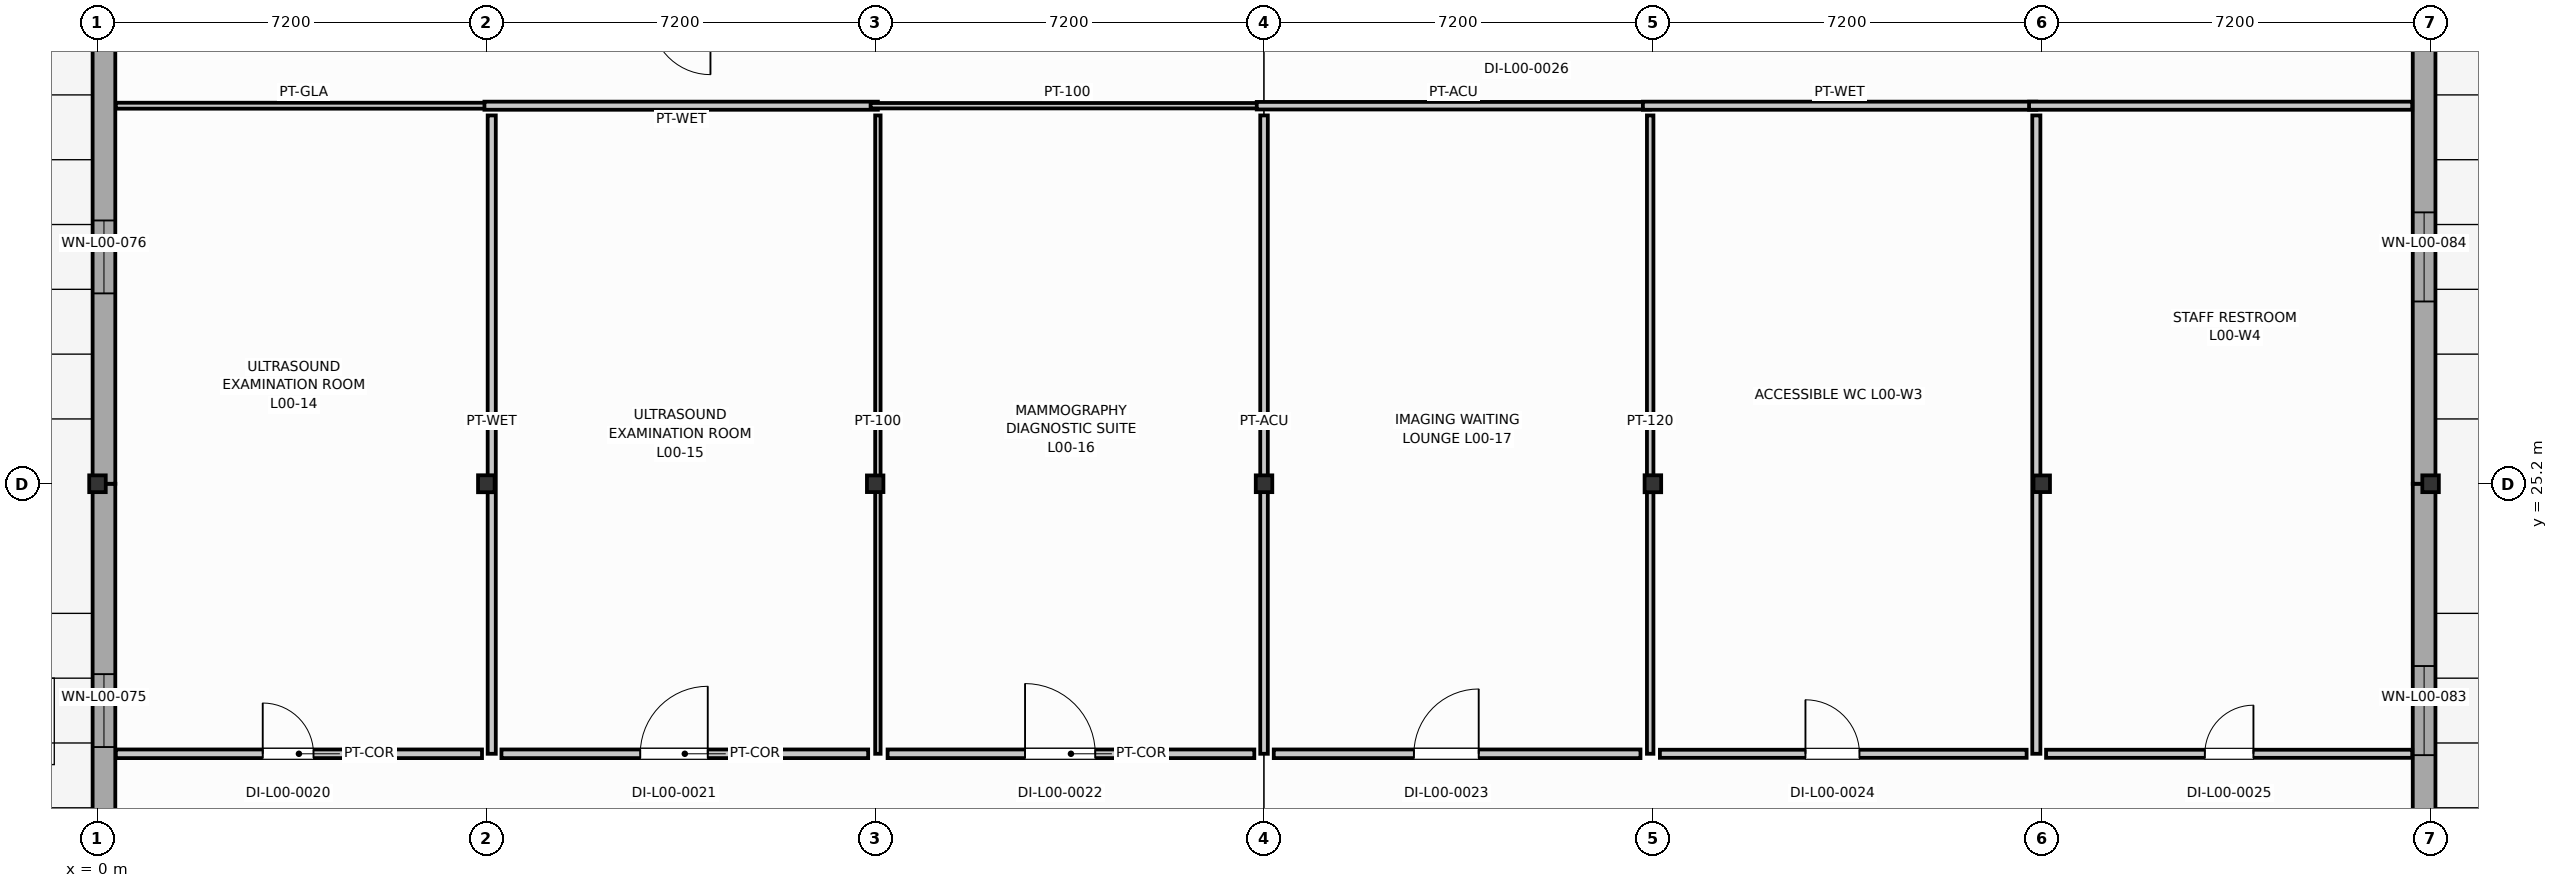
"""IFC4 building model, lengths in metres.
Left out: names, types, materials, properties, quantities, classifications, styles, units other than length and angle.
Written with IfcOpenShell. Run it as: python <this file> out.ifc"""

import sys

from ifc_helpers import new_model, si_unit, direction, frame, frame_2d, origin, origin_2d, place, context, subcontext, project, spatial, rectangle, i_section, extrude, element, fill, save


model = new_model("IFC4")
c1 = context("Model", 3, precision=1e-05, world=origin(), true_north=direction((0.0, 1.0)))
c2 = subcontext(c1, "Body", "Model", "MODEL_VIEW")
j1 = project(units=[si_unit("LENGTHUNIT", "METRE"), si_unit("PLANEANGLEUNIT", "RADIAN")], contexts=[c1])
p1 = place(None, origin())
s1 = spatial("IfcSite", under=j1, at=p1, CompositionType="ELEMENT")
p2 = place(p1, origin())
s2 = spatial("IfcBuilding", under=s1, at=p2, CompositionType="ELEMENT")
p3 = place(p2, origin())
s3 = spatial("IfcBuildingStorey", under=s2, at=p3, CompositionType="ELEMENT", Elevation=0.0)
p4 = place(p3, frame((0.0, 25.2, 0.0), z_axis=(0.0, 0.0, 1.0), x_axis=(1.0, 0.0, 0.0)))
e1 = element("IfcColumn", 1, at=p4, inside=s3, PredefinedType="COLUMN", context=c2, shape_type="SweptSolid", body=[
    extrude(i_section(OverallWidth=0.306, OverallDepth=0.311, WebThickness=0.011, FlangeThickness=0.017, FilletRadius=0.015, at=origin_2d()), origin(), (0.0, 0.0, 1.0), 4.8),
])
p5 = place(p3, frame((7.2, 25.2, 0.0), z_axis=(0.0, 0.0, 1.0), x_axis=(1.0, 0.0, 0.0)))
e2 = element("IfcColumn", 2, at=p5, inside=s3, PredefinedType="COLUMN", context=c2, shape_type="SweptSolid", body=[
    extrude(i_section(OverallWidth=0.307, OverallDepth=0.314, WebThickness=0.012, FlangeThickness=0.019, FilletRadius=0.016, at=origin_2d()), origin(), (0.0, 0.0, 1.0), 4.8),
])
p6 = place(p3, frame((14.4, 25.2, 0.0), z_axis=(0.0, 0.0, 1.0), x_axis=(1.0, 0.0, 0.0)))
e3 = element("IfcColumn", 3, at=p6, inside=s3, PredefinedType="COLUMN", context=c2, shape_type="SweptSolid", body=[
    extrude(i_section(OverallWidth=0.305, OverallDepth=0.308, WebThickness=0.01, FlangeThickness=0.015, FilletRadius=0.015, at=origin_2d()), origin(), (0.0, 0.0, 1.0), 4.8),
])
p7 = place(p3, frame((21.6, 25.2, 0.0), z_axis=(0.0, 0.0, 1.0), x_axis=(1.0, 0.0, 0.0)))
e4 = element("IfcColumn", 4, at=p7, inside=s3, PredefinedType="COLUMN", context=c2, shape_type="SweptSolid", body=[
    extrude(i_section(OverallWidth=0.306, OverallDepth=0.311, WebThickness=0.011, FlangeThickness=0.017, FilletRadius=0.015, at=origin_2d()), origin(), (0.0, 0.0, 1.0), 4.8),
])
p8 = place(p3, frame((28.8, 25.2, 0.0), z_axis=(0.0, 0.0, 1.0), x_axis=(1.0, 0.0, 0.0)))
e5 = element("IfcColumn", 5, at=p8, inside=s3, PredefinedType="COLUMN", context=c2, shape_type="SweptSolid", body=[
    extrude(i_section(OverallWidth=0.307, OverallDepth=0.314, WebThickness=0.012, FlangeThickness=0.019, FilletRadius=0.016, at=origin_2d()), origin(), (0.0, 0.0, 1.0), 4.8),
])
p9 = place(p3, frame((36.0, 25.2, 0.0), z_axis=(0.0, 0.0, 1.0), x_axis=(1.0, 0.0, 0.0)))
e6 = element("IfcColumn", 6, at=p9, inside=s3, PredefinedType="COLUMN", context=c2, shape_type="SweptSolid", body=[
    extrude(i_section(OverallWidth=0.305, OverallDepth=0.308, WebThickness=0.01, FlangeThickness=0.015, FilletRadius=0.015, at=origin_2d()), origin(), (0.0, 0.0, 1.0), 4.8),
])
p10 = place(p3, frame((43.2, 25.2, 0.0), z_axis=(0.0, 0.0, 1.0), x_axis=(1.0, 0.0, 0.0)))
e7 = element("IfcColumn", 7, at=p10, inside=s3, PredefinedType="COLUMN", context=c2, shape_type="SweptSolid", body=[
    extrude(i_section(OverallWidth=0.306, OverallDepth=0.311, WebThickness=0.011, FlangeThickness=0.017, FilletRadius=0.015, at=origin_2d()), origin(), (0.0, 0.0, 1.0), 4.8),
])
p11 = place(p3, frame((0.12, 16.8, 0.0), z_axis=(0.0, 0.0, 1.0), x_axis=(0.0, 1.0, 0.0)))
e8 = element("IfcWall", 8, at=p11, inside=s3, PredefinedType="SOLIDWALL", context=c2, shape_type="SweptSolid", body=[
    extrude(rectangle(XDim=8.4, YDim=0.42, at=frame_2d((4.2, 0.0))), origin(), (0.0, 0.0, 1.0), 3.691),
])
p12 = place(p11, frame((3.525, 0.0, 0.95)))
e9 = element("IfcOpeningElement", 9, at=p12, cuts=e8, PredefinedType="OPENING", context=c2, shape_type="SweptSolid", body=[
    extrude(rectangle(XDim=1.35, YDim=1.55, at=frame_2d((0.675, 0.775))), frame((0.0, 0.22, 0.0), z_axis=(0.0, -1.0, 0.0), x_axis=(1.0, 0.0, 0.0)), (0.0, 0.0, 1.0), 0.44),
])
p13 = place(p3, frame((0.12, 25.2, 0.0), z_axis=(0.0, 0.0, 1.0), x_axis=(0.0, 1.0, 0.0)))
e10 = element("IfcWall", 10, at=p13, inside=s3, PredefinedType="SOLIDWALL", context=c2, shape_type="SweptSolid", body=[
    extrude(rectangle(XDim=8.4, YDim=0.42, at=frame_2d((4.2, 0.0))), origin(), (0.0, 0.0, 1.0), 3.772),
])
p14 = place(p13, frame((3.525, 0.0, 0.95)))
e11 = element("IfcOpeningElement", 11, at=p14, cuts=e10, PredefinedType="OPENING", context=c2, shape_type="SweptSolid", body=[
    extrude(rectangle(XDim=1.35, YDim=1.75, at=frame_2d((0.675, 0.875))), frame((0.0, 0.22, 0.0), z_axis=(0.0, -1.0, 0.0), x_axis=(1.0, 0.0, 0.0)), (0.0, 0.0, 1.0), 0.44),
])
p15 = place(p3, frame((43.08, 16.8, 0.0), z_axis=(0.0, 0.0, 1.0), x_axis=(0.0, 1.0, 0.0)))
e12 = element("IfcWall", 12, at=p15, inside=s3, PredefinedType="SOLIDWALL", context=c2, shape_type="SweptSolid", body=[
    extrude(rectangle(XDim=8.4, YDim=0.42, at=frame_2d((4.2, 0.0))), origin(), (0.0, 0.0, 1.0), 3.998),
])
p16 = place(p15, frame((3.375, 0.0, 0.95)))
e13 = element("IfcOpeningElement", 13, at=p16, cuts=e12, PredefinedType="OPENING", context=c2, shape_type="SweptSolid", body=[
    extrude(rectangle(XDim=1.65, YDim=1.55, at=frame_2d((0.825, 0.775))), frame((0.0, 0.22, 0.0), z_axis=(0.0, -1.0, 0.0), x_axis=(1.0, 0.0, 0.0)), (0.0, 0.0, 1.0), 0.44),
])
p17 = place(p3, frame((43.08, 25.2, 0.0), z_axis=(0.0, 0.0, 1.0), x_axis=(0.0, 1.0, 0.0)))
e14 = element("IfcWall", 14, at=p17, inside=s3, PredefinedType="SOLIDWALL", context=c2, shape_type="SweptSolid", body=[
    extrude(rectangle(XDim=8.4, YDim=0.42, at=frame_2d((4.2, 0.0))), origin(), (0.0, 0.0, 1.0), 4.005),
])
p18 = place(p17, frame((3.375, 0.0, 0.95)))
e15 = element("IfcOpeningElement", 15, at=p18, cuts=e14, PredefinedType="OPENING", context=c2, shape_type="SweptSolid", body=[
    extrude(rectangle(XDim=1.65, YDim=1.75, at=frame_2d((0.825, 0.875))), frame((0.0, 0.22, 0.0), z_axis=(0.0, -1.0, 0.0), x_axis=(1.0, 0.0, 0.0)), (0.0, 0.0, 1.0), 0.44),
])
p19 = place(p3, frame((0.34, 32.2, 0.0), z_axis=(0.0, 0.0, 1.0), x_axis=(1.0, 0.0, 0.0)))
e16 = element("IfcWall", 16, at=p19, inside=s3, PredefinedType="MOVABLE", context=c2, shape_type="SweptSolid", body=[
    extrude(rectangle(XDim=6.96, YDim=0.11, at=frame_2d((3.48, 0.0))), origin(), (0.0, 0.0, 1.0), 4.001),
])
p20 = place(p3, frame((7.3, 32.02, 0.0), z_axis=(0.0, 0.0, 1.0), x_axis=(0.0, -1.0, 0.0)))
e17 = element("IfcWall", 17, at=p20, inside=s3, PredefinedType="PLUMBINGWALL", context=c2, shape_type="SweptSolid", body=[
    extrude(rectangle(XDim=11.82, YDim=0.15, at=frame_2d((5.91, 0.0))), origin(), (0.0, 0.0, 1.0), 3.928),
])
p21 = place(p3, frame((7.12, 20.2, 0.0), z_axis=(0.0, 0.0, 1.0), x_axis=(-1.0, 0.0, 0.0)))
e18 = element("IfcWall", 18, at=p21, inside=s3, PredefinedType="PARTITIONING", context=c2, shape_type="SweptSolid", body=[
    extrude(rectangle(XDim=6.78, YDim=0.16, at=frame_2d((3.39, 0.0))), origin(), (0.0, 0.0, 1.0), 3.928),
])
p22 = place(p21, frame((3.12, 0.0, 0.0)))
e19 = element("IfcOpeningElement", 19, at=p22, cuts=e18, PredefinedType="OPENING", context=c2, shape_type="SweptSolid", body=[
    extrude(rectangle(XDim=0.94, YDim=2.05, at=frame_2d((0.47, 1.025))), frame((0.0, 0.09, 0.0), z_axis=(0.0, -1.0, 0.0), x_axis=(1.0, 0.0, 0.0)), (0.0, 0.0, 1.0), 0.18),
])
p23 = place(p3, frame((7.165, 32.2, 0.0), z_axis=(0.0, 0.0, 1.0), x_axis=(1.0, 0.0, 0.0)))
e20 = element("IfcWall", 20, at=p23, inside=s3, PredefinedType="PLUMBINGWALL", context=c2, shape_type="SweptSolid", body=[
    extrude(rectangle(XDim=7.285, YDim=0.15, at=frame_2d((3.643, 0.0))), origin(), (0.0, 0.0, 1.0), 4.001),
])
p24 = place(p3, frame((14.45, 32.02, 0.0), z_axis=(0.0, 0.0, 1.0), x_axis=(0.0, -1.0, 0.0)))
e21 = element("IfcWall", 21, at=p24, inside=s3, PredefinedType="PARTITIONING", context=c2, shape_type="SweptSolid", body=[
    extrude(rectangle(XDim=11.82, YDim=0.1, at=frame_2d((5.91, 0.0))), origin(), (0.0, 0.0, 1.0), 4.008),
])
p25 = place(p3, frame((14.27, 20.2, 0.0), z_axis=(0.0, 0.0, 1.0), x_axis=(-1.0, 0.0, 0.0)))
e22 = element("IfcWall", 22, at=p25, inside=s3, PredefinedType="PARTITIONING", context=c2, shape_type="SweptSolid", body=[
    extrude(rectangle(XDim=6.79, YDim=0.16, at=frame_2d((3.395, 0.0))), origin(), (0.0, 0.0, 1.0), 4.008),
])
p26 = place(p25, frame((2.97, 0.0, 0.0)))
e23 = element("IfcOpeningElement", 23, at=p26, cuts=e22, PredefinedType="OPENING", context=c2, shape_type="SweptSolid", body=[
    extrude(rectangle(XDim=1.25, YDim=2.15, at=frame_2d((0.625, 1.075))), frame((0.0, 0.09, 0.0), z_axis=(0.0, -1.0, 0.0), x_axis=(1.0, 0.0, 0.0)), (0.0, 0.0, 1.0), 0.18),
])
p27 = place(p3, frame((14.315, 32.2, 0.0), z_axis=(0.0, 0.0, 1.0), x_axis=(1.0, 0.0, 0.0)))
e24 = element("IfcWall", 24, at=p27, inside=s3, PredefinedType="PARTITIONING", context=c2, shape_type="SweptSolid", body=[
    extrude(rectangle(XDim=7.285, YDim=0.1, at=frame_2d((3.643, 0.0))), origin(), (0.0, 0.0, 1.0), 4.079),
])
p28 = place(p3, frame((21.6, 32.02, 0.0), z_axis=(0.0, 0.0, 1.0), x_axis=(0.0, -1.0, 0.0)))
e25 = element("IfcWall", 25, at=p28, inside=s3, PredefinedType="PARTITIONING", context=c2, shape_type="SweptSolid", body=[
    extrude(rectangle(XDim=11.82, YDim=0.14, at=frame_2d((5.91, 0.0))), origin(), (0.0, 0.0, 1.0), 4.085),
])
p29 = place(p3, frame((21.42, 20.2, 0.0), z_axis=(0.0, 0.0, 1.0), x_axis=(-1.0, 0.0, 0.0)))
e26 = element("IfcWall", 26, at=p29, inside=s3, PredefinedType="PARTITIONING", context=c2, shape_type="SweptSolid", body=[
    extrude(rectangle(XDim=6.79, YDim=0.16, at=frame_2d((3.395, 0.0))), origin(), (0.0, 0.0, 1.0), 4.008),
])
p30 = place(p29, frame((2.945, 0.0, 0.0)))
e27 = element("IfcOpeningElement", 27, at=p30, cuts=e26, PredefinedType="OPENING", context=c2, shape_type="SweptSolid", body=[
    extrude(rectangle(XDim=1.3, YDim=2.15, at=frame_2d((0.65, 1.075))), frame((0.0, 0.09, 0.0), z_axis=(0.0, -1.0, 0.0), x_axis=(1.0, 0.0, 0.0)), (0.0, 0.0, 1.0), 0.18),
])
p31 = place(p3, frame((21.465, 32.2, 0.0), z_axis=(0.0, 0.0, 1.0), x_axis=(1.0, 0.0, 0.0)))
e28 = element("IfcWall", 28, at=p31, inside=s3, PredefinedType="PARTITIONING", context=c2, shape_type="SweptSolid", body=[
    extrude(rectangle(XDim=7.285, YDim=0.14, at=frame_2d((3.643, 0.0))), origin(), (0.0, 0.0, 1.0), 4.079),
])
p32 = place(p3, frame((28.75, 32.02, 0.0), z_axis=(0.0, 0.0, 1.0), x_axis=(0.0, -1.0, 0.0)))
e29 = element("IfcWall", 29, at=p32, inside=s3, PredefinedType="PARTITIONING", context=c2, shape_type="SweptSolid", body=[
    extrude(rectangle(XDim=11.82, YDim=0.12, at=frame_2d((5.91, 0.0))), origin(), (0.0, 0.0, 1.0), 4.008),
])
p33 = place(p3, frame((28.57, 20.2, 0.0), z_axis=(0.0, 0.0, 1.0), x_axis=(-1.0, 0.0, 0.0)))
e30 = element("IfcWall", 30, at=p33, inside=s3, PredefinedType="PARTITIONING", context=c2, shape_type="SweptSolid", body=[
    extrude(rectangle(XDim=6.79, YDim=0.16, at=frame_2d((3.395, 0.0))), origin(), (0.0, 0.0, 1.0), 4.008),
])
p34 = place(p33, frame((2.995, 0.0, 0.0)))
e31 = element("IfcOpeningElement", 31, at=p34, cuts=e30, PredefinedType="OPENING", context=c2, shape_type="SweptSolid", body=[
    extrude(rectangle(XDim=1.2, YDim=2.15, at=frame_2d((0.6, 1.075))), frame((0.0, 0.09, 0.0), z_axis=(0.0, -1.0, 0.0), x_axis=(1.0, 0.0, 0.0)), (0.0, 0.0, 1.0), 0.18),
])
p35 = place(p3, frame((28.615, 32.2, 0.0), z_axis=(0.0, 0.0, 1.0), x_axis=(1.0, 0.0, 0.0)))
e32 = element("IfcWall", 32, at=p35, inside=s3, PredefinedType="PLUMBINGWALL", context=c2, shape_type="SweptSolid", body=[
    extrude(rectangle(XDim=7.285, YDim=0.15, at=frame_2d((3.643, 0.0))), origin(), (0.0, 0.0, 1.0), 4.001),
])
p36 = place(p3, frame((35.9, 32.02, 0.0), z_axis=(0.0, 0.0, 1.0), x_axis=(0.0, -1.0, 0.0)))
e33 = element("IfcWall", 33, at=p36, inside=s3, PredefinedType="PLUMBINGWALL", context=c2, shape_type="SweptSolid", body=[
    extrude(rectangle(XDim=11.82, YDim=0.15, at=frame_2d((5.91, 0.0))), origin(), (0.0, 0.0, 1.0), 3.928),
])
p37 = place(p3, frame((35.72, 20.2, 0.0), z_axis=(0.0, 0.0, 1.0), x_axis=(-1.0, 0.0, 0.0)))
e34 = element("IfcWall", 34, at=p37, inside=s3, PredefinedType="PLUMBINGWALL", context=c2, shape_type="SweptSolid", body=[
    extrude(rectangle(XDim=6.79, YDim=0.15, at=frame_2d((3.395, 0.0))), origin(), (0.0, 0.0, 1.0), 4.008),
])
p38 = place(p37, frame((3.095, 0.0, 0.0)))
e35 = element("IfcOpeningElement", 35, at=p38, cuts=e34, PredefinedType="OPENING", context=c2, shape_type="SweptSolid", body=[
    extrude(rectangle(XDim=1.0, YDim=2.1, at=frame_2d((0.5, 1.05))), frame((0.0, 0.085, 0.0), z_axis=(0.0, -1.0, 0.0), x_axis=(1.0, 0.0, 0.0)), (0.0, 0.0, 1.0), 0.17),
])
p39 = place(p3, frame((35.765, 32.2, 0.0), z_axis=(0.0, 0.0, 1.0), x_axis=(1.0, 0.0, 0.0)))
e36 = element("IfcWall", 36, at=p39, inside=s3, PredefinedType="PLUMBINGWALL", context=c2, shape_type="SweptSolid", body=[
    extrude(rectangle(XDim=7.095, YDim=0.15, at=frame_2d((3.548, 0.0))), origin(), (0.0, 0.0, 1.0), 4.001),
])
p40 = place(p3, frame((42.86, 20.2, 0.0), z_axis=(0.0, 0.0, 1.0), x_axis=(-1.0, 0.0, 0.0)))
e37 = element("IfcWall", 37, at=p40, inside=s3, PredefinedType="PLUMBINGWALL", context=c2, shape_type="SweptSolid", body=[
    extrude(rectangle(XDim=6.78, YDim=0.15, at=frame_2d((3.39, 0.0))), origin(), (0.0, 0.0, 1.0), 3.928),
])
p41 = place(p40, frame((2.94, 0.0, 0.0)))
e38 = element("IfcOpeningElement", 38, at=p41, cuts=e37, PredefinedType="OPENING", context=c2, shape_type="SweptSolid", body=[
    extrude(rectangle(XDim=0.9, YDim=2.1, at=frame_2d((0.45, 1.05))), frame((0.0, 0.085, 0.0), z_axis=(0.0, -1.0, 0.0), x_axis=(1.0, 0.0, 0.0)), (0.0, 0.0, 1.0), 0.17),
])
p42 = place(p12, origin())
e39 = element("IfcWindow", 39, at=p42, inside=s3, PartitioningType="SINGLE_PANEL", PredefinedType="WINDOW", context=c2, shape_type="SweptSolid", body=[
    extrude(rectangle(XDim=1.35, YDim=1.55, at=frame_2d((0.675, 0.775))), frame((0.0, 0.03, 0.0), z_axis=(0.0, -1.0, 0.0), x_axis=(1.0, 0.0, 0.0)), (0.0, 0.0, 1.0), 0.06),
])
fill(e9, e39)
p43 = place(p14, origin())
e40 = element("IfcWindow", 40, at=p43, inside=s3, PartitioningType="SINGLE_PANEL", PredefinedType="WINDOW", context=c2, shape_type="SweptSolid", body=[
    extrude(rectangle(XDim=1.35, YDim=1.75, at=frame_2d((0.675, 0.875))), frame((0.0, 0.03, 0.0), z_axis=(0.0, -1.0, 0.0), x_axis=(1.0, 0.0, 0.0)), (0.0, 0.0, 1.0), 0.06),
])
fill(e11, e40)
p44 = place(p16, origin())
e41 = element("IfcWindow", 41, at=p44, inside=s3, PartitioningType="SINGLE_PANEL", PredefinedType="WINDOW", context=c2, shape_type="SweptSolid", body=[
    extrude(rectangle(XDim=1.65, YDim=1.55, at=frame_2d((0.825, 0.775))), frame((0.0, 0.03, 0.0), z_axis=(0.0, -1.0, 0.0), x_axis=(1.0, 0.0, 0.0)), (0.0, 0.0, 1.0), 0.06),
])
fill(e13, e41)
p45 = place(p18, origin())
e42 = element("IfcWindow", 42, at=p45, inside=s3, PartitioningType="SINGLE_PANEL", PredefinedType="WINDOW", context=c2, shape_type="SweptSolid", body=[
    extrude(rectangle(XDim=1.65, YDim=1.75, at=frame_2d((0.825, 0.875))), frame((0.0, 0.03, 0.0), z_axis=(0.0, -1.0, 0.0), x_axis=(1.0, 0.0, 0.0)), (0.0, 0.0, 1.0), 0.06),
])
fill(e15, e42)
p46 = place(p22, frame((0.94, 0.0, 0.0), z_axis=(0.0, 0.0, 1.0), x_axis=(-1.0, 0.0, 0.0)))
e43 = element("IfcDoor", 43, at=p46, inside=s3, OperationType="SINGLE_SWING_LEFT", PredefinedType="DOOR", context=c2, shape_type="SweptSolid", body=[
    extrude(rectangle(XDim=0.94, YDim=2.05, at=frame_2d((0.47, 1.025))), frame((0.0, 0.025, 0.0), z_axis=(0.0, -1.0, 0.0), x_axis=(1.0, 0.0, 0.0)), (0.0, 0.0, 1.0), 0.05),
])
fill(e19, e43)
p47 = place(p26, frame((1.25, 0.0, 0.0), z_axis=(0.0, 0.0, 1.0), x_axis=(-1.0, 0.0, 0.0)))
e44 = element("IfcDoor", 44, at=p47, inside=s3, OperationType="SINGLE_SWING_RIGHT", PredefinedType="DOOR", context=c2, shape_type="SweptSolid", body=[
    extrude(rectangle(XDim=1.25, YDim=2.15, at=frame_2d((0.625, 1.075))), frame((0.0, 0.025, 0.0), z_axis=(0.0, -1.0, 0.0), x_axis=(1.0, 0.0, 0.0)), (0.0, 0.0, 1.0), 0.05),
])
fill(e23, e44)
p48 = place(p30, frame((1.3, 0.0, 0.0), z_axis=(0.0, 0.0, 1.0), x_axis=(-1.0, 0.0, 0.0)))
e45 = element("IfcDoor", 45, at=p48, inside=s3, OperationType="SINGLE_SWING_LEFT", PredefinedType="DOOR", context=c2, shape_type="SweptSolid", body=[
    extrude(rectangle(XDim=1.3, YDim=2.15, at=frame_2d((0.65, 1.075))), frame((0.0, 0.025, 0.0), z_axis=(0.0, -1.0, 0.0), x_axis=(1.0, 0.0, 0.0)), (0.0, 0.0, 1.0), 0.05),
])
fill(e27, e45)
p49 = place(p34, frame((1.2, 0.0, 0.0), z_axis=(0.0, 0.0, 1.0), x_axis=(-1.0, 0.0, 0.0)))
e46 = element("IfcDoor", 46, at=p49, inside=s3, OperationType="SINGLE_SWING_RIGHT", PredefinedType="DOOR", context=c2, shape_type="SweptSolid", body=[
    extrude(rectangle(XDim=1.2, YDim=2.15, at=frame_2d((0.6, 1.075))), frame((0.0, 0.025, 0.0), z_axis=(0.0, -1.0, 0.0), x_axis=(1.0, 0.0, 0.0)), (0.0, 0.0, 1.0), 0.05),
])
fill(e31, e46)
p50 = place(p38, frame((1.0, 0.0, 0.0), z_axis=(0.0, 0.0, 1.0), x_axis=(-1.0, 0.0, 0.0)))
e47 = element("IfcDoor", 47, at=p50, inside=s3, OperationType="SINGLE_SWING_LEFT", PredefinedType="DOOR", context=c2, shape_type="SweptSolid", body=[
    extrude(rectangle(XDim=1.0, YDim=2.1, at=frame_2d((0.5, 1.05))), frame((0.0, 0.025, 0.0), z_axis=(0.0, -1.0, 0.0), x_axis=(1.0, 0.0, 0.0)), (0.0, 0.0, 1.0), 0.05),
])
fill(e35, e47)
p51 = place(p41, frame((0.9, 0.0, 0.0), z_axis=(0.0, 0.0, 1.0), x_axis=(-1.0, 0.0, 0.0)))
e48 = element("IfcDoor", 48, at=p51, inside=s3, OperationType="SINGLE_SWING_RIGHT", PredefinedType="DOOR", context=c2, shape_type="SweptSolid", body=[
    extrude(rectangle(XDim=0.9, YDim=2.1, at=frame_2d((0.45, 1.05))), frame((0.0, 0.025, 0.0), z_axis=(0.0, -1.0, 0.0), x_axis=(1.0, 0.0, 0.0)), (0.0, 0.0, 1.0), 0.05),
])
fill(e38, e48)
save(model, sys.argv[1])
